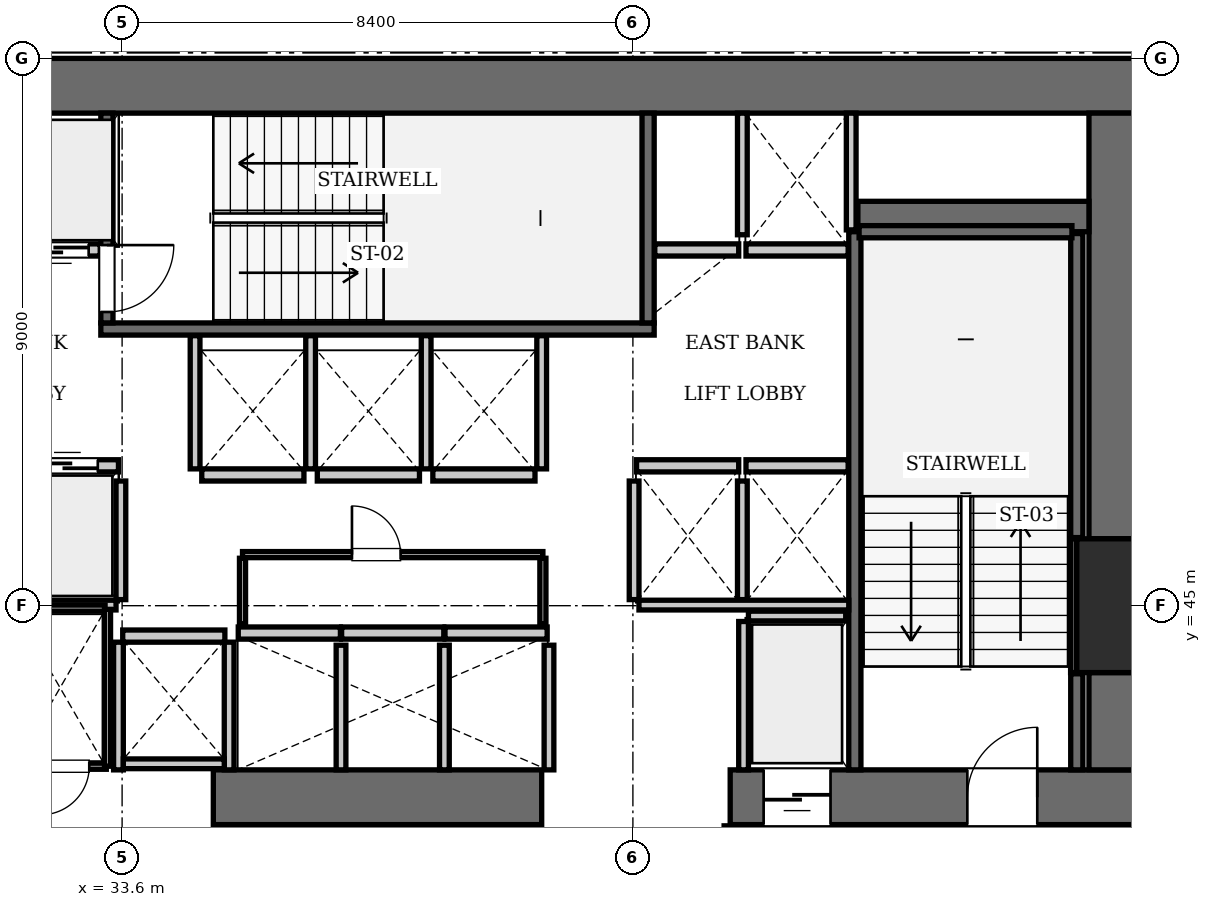
"""IFC4 building model, lengths in metres.
Left out: names, types, materials, properties, quantities, classifications, styles, units other than length and angle.
Written with IfcOpenShell. Run it as: python <this file> out.ifc"""

import sys

from ifc_helpers import new_model, si_unit, direction, frame, frame_2d, origin, origin_2d, place, context, subcontext, project, spatial, rectangle, extrude, element, fill, save


model = new_model("IFC4")
c1 = context("Model", 3, precision=1e-05, world=origin(), true_north=direction((0.0, 1.0)))
c2 = subcontext(c1, "Body", "Model", "MODEL_VIEW")
j1 = project(units=[si_unit("LENGTHUNIT", "METRE"), si_unit("PLANEANGLEUNIT", "RADIAN")], contexts=[c1])
p1 = place(None, origin())
s1 = spatial("IfcSite", under=j1, at=p1, CompositionType="ELEMENT")
p2 = place(p1, origin())
s2 = spatial("IfcBuilding", under=s1, at=p2, CompositionType="ELEMENT")
p3 = place(p2, frame((0.0, 0.0, 88.55)))
s3 = spatial("IfcBuildingStorey", under=s2, at=p3, CompositionType="ELEMENT", Elevation=88.55)
p4 = place(p3, frame((50.4, 45.0, 0.0), z_axis=(0.0, 0.0, 1.0), x_axis=(1.0, 0.0, 0.0)))
e1 = element("IfcColumn", 1, at=p4, inside=s3, PredefinedType="COLUMN", context=c2, shape_type="SweptSolid", body=[
    extrude(rectangle(XDim=2.2, YDim=2.2, at=origin_2d()), origin(), (0.0, 0.0, 1.0), 3.85),
])
p5 = place(p3, frame((25.2, 53.55, 0.0), z_axis=(0.0, 0.0, 1.0), x_axis=(1.0, 0.0, 0.0)))
e2 = element("IfcWall", 2, at=p5, inside=s3, PredefinedType="SHEAR", context=c2, shape_type="SweptSolid", body=[
    extrude(rectangle(XDim=25.2, YDim=0.9, at=frame_2d((12.6, 0.0))), origin(), (0.0, 0.0, 1.0), 3.85),
])
p6 = place(p3, frame((35.1, 41.85, 0.0), z_axis=(0.0, 0.0, 1.0), x_axis=(1.0, 0.0, 0.0)))
e3 = element("IfcWall", 3, at=p6, inside=s3, PredefinedType="SHEAR", context=c2, shape_type="SweptSolid", body=[
    extrude(rectangle(XDim=5.4, YDim=0.9, at=frame_2d((2.7, 0.0))), origin(), (0.0, 0.0, 1.0), 3.85),
])
p7 = place(p3, frame((43.6, 41.85, 0.0), z_axis=(0.0, 0.0, 1.0), x_axis=(1.0, 0.0, 0.0)))
e4 = element("IfcWall", 4, at=p7, inside=s3, PredefinedType="SHEAR", context=c2, shape_type="SweptSolid", body=[
    extrude(rectangle(XDim=6.8, YDim=0.9, at=frame_2d((3.4, 0.0))), origin(), (0.0, 0.0, 1.0), 3.85),
])
p8 = place(p7, frame((3.9, 0.0, 0.0)))
e5 = element("IfcOpeningElement", 5, at=p8, cuts=e4, PredefinedType="OPENING", context=c2, shape_type="SweptSolid", body=[
    extrude(rectangle(XDim=1.15, YDim=2.15, at=frame_2d((0.575, 1.075))), frame((0.0, 0.46, 0.0), z_axis=(0.0, -1.0, 0.0), x_axis=(1.0, 0.0, 0.0)), (0.0, 0.0, 1.0), 0.92),
])
p9 = place(p7, frame((0.55, 0.0, 0.0)))
e6 = element("IfcOpeningElement", 6, at=p9, cuts=e4, PredefinedType="OPENING", context=c2, shape_type="SweptSolid", body=[
    extrude(rectangle(XDim=1.1, YDim=2.2, at=frame_2d((0.55, 1.1))), frame((0.0, 0.46, 0.0), z_axis=(0.0, -1.0, 0.0), x_axis=(1.0, 0.0, 0.0)), (0.0, 0.0, 1.0), 0.92),
])
p10 = place(p3, frame((49.95, 42.3, 0.0), z_axis=(0.0, 0.0, 1.0), x_axis=(0.0, 1.0, 0.0)))
e7 = element("IfcWall", 7, at=p10, inside=s3, PredefinedType="SHEAR", context=c2, shape_type="SweptSolid", body=[
    extrude(rectangle(XDim=1.6, YDim=0.9, at=frame_2d((0.8, 0.0))), origin(), (0.0, 0.0, 1.0), 3.85),
])
p11 = place(p3, frame((49.95, 46.1, 0.0), z_axis=(0.0, 0.0, 1.0), x_axis=(0.0, 1.0, 0.0)))
e8 = element("IfcWall", 8, at=p11, inside=s3, PredefinedType="SHEAR", context=c2, shape_type="SweptSolid", body=[
    extrude(rectangle(XDim=7.0, YDim=0.9, at=frame_2d((3.5, 0.0))), origin(), (0.0, 0.0, 1.0), 3.85),
])
p12 = place(p3, frame((45.7, 51.4, 0.0), z_axis=(0.0, 0.0, 1.0), x_axis=(1.0, 0.0, 0.0)))
e9 = element("IfcWall", 9, at=p12, inside=s3, PredefinedType="SHEAR", context=c2, shape_type="SweptSolid", body=[
    extrude(rectangle(XDim=3.8, YDim=0.5, at=frame_2d((1.9, 0.0))), origin(), (0.0, 0.0, 1.0), 3.85),
])
p13 = place(p3, frame((33.25, 49.55, 0.0), z_axis=(0.0, 0.0, 1.0), x_axis=(1.0, 0.0, 0.0)))
e10 = element("IfcWall", 10, at=p13, inside=s3, PredefinedType="SOLIDWALL", context=c2, shape_type="SweptSolid", body=[
    extrude(rectangle(XDim=9.1, YDim=0.2, at=frame_2d((4.55, 0.0))), origin(), (0.0, 0.0, 1.0), 3.61),
])
p14 = place(p3, frame((42.25, 49.65, 0.0), z_axis=(0.0, 0.0, 1.0), x_axis=(0.0, 1.0, 0.0)))
e11 = element("IfcWall", 11, at=p14, inside=s3, PredefinedType="SOLIDWALL", context=c2, shape_type="SweptSolid", body=[
    extrude(rectangle(XDim=3.45, YDim=0.2, at=frame_2d((1.725, 0.0))), origin(), (0.0, 0.0, 1.0), 3.61),
])
p15 = place(p3, frame((33.35, 49.65, 0.0), z_axis=(0.0, 0.0, 1.0), x_axis=(0.0, 1.0, 0.0)))
e12 = element("IfcWall", 12, at=p15, inside=s3, PredefinedType="SOLIDWALL", context=c2, shape_type="SweptSolid", body=[
    extrude(rectangle(XDim=3.45, YDim=0.2, at=frame_2d((1.725, 0.0))), origin(), (0.0, 0.0, 1.0), 3.61),
])
p16 = place(p15, frame((0.18, 0.0, 0.0)))
e13 = element("IfcOpeningElement", 13, at=p16, cuts=e12, PredefinedType="OPENING", context=c2, shape_type="SweptSolid", body=[
    extrude(rectangle(XDim=1.1, YDim=2.15, at=frame_2d((0.55, 1.075))), frame((0.0, 0.11, 0.0), z_axis=(0.0, -1.0, 0.0), x_axis=(1.0, 0.0, 0.0)), (0.0, 0.0, 1.0), 0.22),
])
p17 = place(p3, frame((45.65, 42.3, 0.0), z_axis=(0.0, 0.0, 1.0), x_axis=(0.0, 1.0, 0.0)))
e14 = element("IfcWall", 14, at=p17, inside=s3, PredefinedType="SOLIDWALL", context=c2, shape_type="SweptSolid", body=[
    extrude(rectangle(XDim=8.85, YDim=0.2, at=frame_2d((4.425, 0.0))), origin(), (0.0, 0.0, 1.0), 3.61),
])
p18 = place(p3, frame((49.3, 42.3, 0.0), z_axis=(0.0, 0.0, 1.0), x_axis=(0.0, 1.0, 0.0)))
e15 = element("IfcWall", 15, at=p18, inside=s3, PredefinedType="SOLIDWALL", context=c2, shape_type="SweptSolid", body=[
    extrude(rectangle(XDim=1.58, YDim=0.2, at=frame_2d((0.79, 0.0))), origin(), (0.0, 0.0, 1.0), 3.61),
])
p19 = place(p3, frame((49.3, 46.12, 0.0), z_axis=(0.0, 0.0, 1.0), x_axis=(0.0, 1.0, 0.0)))
e16 = element("IfcWall", 16, at=p19, inside=s3, PredefinedType="SOLIDWALL", context=c2, shape_type="SweptSolid", body=[
    extrude(rectangle(XDim=5.0, YDim=0.2, at=frame_2d((2.5, 0.0))), origin(), (0.0, 0.0, 1.0), 3.61),
])
p20 = place(p3, frame((45.72, 51.15, 0.0), z_axis=(0.0, 0.0, 1.0), x_axis=(1.0, 0.0, 0.0)))
e17 = element("IfcWall", 17, at=p20, inside=s3, PredefinedType="SOLIDWALL", context=c2, shape_type="SweptSolid", body=[
    extrude(rectangle(XDim=3.5, YDim=0.2, at=frame_2d((1.75, 0.0))), origin(), (0.0, 0.0, 1.0), 3.61),
])
p21 = place(p3, frame((49.248, 43.9, 0.0), z_axis=(0.0, 0.0, 1.0), x_axis=(0.0, 1.0, 0.0)))
e18 = element("IfcWall", 18, at=p21, inside=s3, PredefinedType="SOLIDWALL", context=c2, shape_type="SweptSolid", body=[
    extrude(rectangle(XDim=2.2, YDim=0.1, at=frame_2d((1.1, 0.0))), origin(), (0.0, 0.0, 1.0), 3.61),
])
p22 = place(p3, frame((31.86, 47.3, 0.0), z_axis=(0.0, 0.0, 1.0), x_axis=(1.0, 0.0, 0.0)))
e19 = element("IfcWall", 19, at=p22, inside=s3, PredefinedType="SOLIDWALL", context=c2, shape_type="SweptSolid", body=[
    extrude(rectangle(XDim=1.68, YDim=0.2, at=frame_2d((0.84, 0.0))), origin(), (0.0, 0.0, 1.0), 3.61),
])
p23 = place(p22, frame((0.34, 0.0, 0.0)))
e20 = element("IfcOpeningElement", 20, at=p23, cuts=e19, PredefinedType="OPENING", context=c2, shape_type="SweptSolid", body=[
    extrude(rectangle(XDim=1.0, YDim=2.15, at=frame_2d((0.5, 1.075))), frame((0.0, 0.11, 0.0), z_axis=(0.0, -1.0, 0.0), x_axis=(1.0, 0.0, 0.0)), (0.0, 0.0, 1.0), 0.22),
])
p24 = place(p3, frame((31.86, 50.85, 0.0), z_axis=(0.0, 0.0, 1.0), x_axis=(1.0, 0.0, 0.0)))
e21 = element("IfcWall", 21, at=p24, inside=s3, PredefinedType="SOLIDWALL", context=c2, shape_type="SweptSolid", body=[
    extrude(rectangle(XDim=1.38, YDim=0.2, at=frame_2d((0.69, 0.0))), origin(), (0.0, 0.0, 1.0), 3.61),
])
p25 = place(p24, frame((0.19, 0.0, 0.0)))
e22 = element("IfcOpeningElement", 22, at=p25, cuts=e21, PredefinedType="OPENING", context=c2, shape_type="SweptSolid", body=[
    extrude(rectangle(XDim=1.0, YDim=2.15, at=frame_2d((0.5, 1.075))), frame((0.0, 0.11, 0.0), z_axis=(0.0, -1.0, 0.0), x_axis=(1.0, 0.0, 0.0)), (0.0, 0.0, 1.0), 0.22),
])
for number, where, z_axis, x_axis in (
    (23, (42.06, 47.3, 0.0), (0.0, 0.0, 1.0), (1.0, 0.0, 0.0)),
    (24, (43.86, 47.3, 0.0), (0.0, 0.0, 1.0), (1.0, 0.0, 0.0)),
):
    element("IfcWall", number, at=place(p3, frame(where, z_axis=z_axis, x_axis=x_axis)), inside=s3, PredefinedType="SOLIDWALL", context=c2, shape_type="SweptSolid", body=[
        extrude(rectangle(XDim=1.68, YDim=0.2, at=frame_2d((0.84, 0.0))), origin(), (0.0, 0.0, 1.0), 3.61),
    ])
p26 = place(p3, frame((42.36, 50.85, 0.0), z_axis=(0.0, 0.0, 1.0), x_axis=(1.0, 0.0, 0.0)))
e25 = element("IfcWall", 25, at=p26, inside=s3, PredefinedType="SOLIDWALL", context=c2, shape_type="SweptSolid", body=[
    extrude(rectangle(XDim=1.38, YDim=0.2, at=frame_2d((0.69, 0.0))), origin(), (0.0, 0.0, 1.0), 3.61),
])
for number, where, z_axis, x_axis in (
    (26, (43.86, 50.85, 0.0), (0.0, 0.0, 1.0), (1.0, 0.0, 0.0)),
    (27, (35.51, 44.55, 0.0), (0.0, 0.0, 1.0), (1.0, 0.0, 0.0)),
    (28, (37.21, 44.55, 0.0), (0.0, 0.0, 1.0), (1.0, 0.0, 0.0)),
):
    element("IfcWall", number, at=place(p3, frame(where, z_axis=z_axis, x_axis=x_axis)), inside=s3, PredefinedType="SOLIDWALL", context=c2, shape_type="SweptSolid", body=[
        extrude(rectangle(XDim=1.68, YDim=0.2, at=frame_2d((0.84, 0.0))), origin(), (0.0, 0.0, 1.0), 3.61),
    ])
for number, where, z_axis, x_axis in (
    (29, (38.91, 44.55, 0.0), (0.0, 0.0, 1.0), (1.0, 0.0, 0.0)),
    (30, (34.91, 47.15, 0.0), (0.0, 0.0, 1.0), (1.0, 0.0, 0.0)),
):
    element("IfcWall", number, at=place(p3, frame(where, z_axis=z_axis, x_axis=x_axis)), inside=s3, PredefinedType="SOLIDWALL", context=c2, shape_type="SweptSolid", body=[
        extrude(rectangle(XDim=1.68, YDim=0.2, at=frame_2d((0.84, 0.0))), origin(), (0.0, 0.0, 1.0), 3.61),
    ])
for number, where, z_axis, x_axis in (
    (31, (36.81, 47.15, 0.0), (0.0, 0.0, 1.0), (1.0, 0.0, 0.0)),
    (32, (38.71, 47.15, 0.0), (0.0, 0.0, 1.0), (1.0, 0.0, 0.0)),
    (33, (33.61, 44.5, 0.0), (0.0, 0.0, 1.0), (1.0, 0.0, 0.0)),
):
    element("IfcWall", number, at=place(p3, frame(where, z_axis=z_axis, x_axis=x_axis)), inside=s3, PredefinedType="SOLIDWALL", context=c2, shape_type="SweptSolid", body=[
        extrude(rectangle(XDim=1.68, YDim=0.2, at=frame_2d((0.84, 0.0))), origin(), (0.0, 0.0, 1.0), 3.61),
    ])
p27 = place(p3, frame((43.9, 44.83, 0.0), z_axis=(0.0, 0.0, 1.0), x_axis=(1.0, 0.0, 0.0)))
e34 = element("IfcWall", 34, at=p27, inside=s3, PredefinedType="SOLIDWALL", context=c2, shape_type="SweptSolid", body=[
    extrude(rectangle(XDim=1.6, YDim=0.16, at=frame_2d((0.8, 0.0))), origin(), (0.0, 0.0, 1.0), 3.61),
])
p28 = place(p3, frame((43.82, 42.3, 0.0), z_axis=(0.0, 0.0, 1.0), x_axis=(0.0, 1.0, 0.0)))
e35 = element("IfcWall", 35, at=p28, inside=s3, PredefinedType="SOLIDWALL", context=c2, shape_type="SweptSolid", body=[
    extrude(rectangle(XDim=2.44, YDim=0.16, at=frame_2d((1.22, 0.0))), origin(), (0.0, 0.0, 1.0), 3.61),
])
p29 = place(p3, frame((33.58, 45.1, 0.0), z_axis=(0.0, 0.0, 1.0), x_axis=(0.0, 1.0, 0.0)))
e36 = element("IfcWall", 36, at=p29, inside=s3, PredefinedType="SOLIDWALL", context=c2, shape_type="SweptSolid", body=[
    extrude(rectangle(XDim=1.95, YDim=0.16, at=frame_2d((0.975, 0.0))), origin(), (0.0, 0.0, 1.0), 3.61),
])
p30 = place(p3, frame((30.05, 45.01, 0.0), z_axis=(0.0, 0.0, 1.0), x_axis=(1.0, 0.0, 0.0)))
e37 = element("IfcWall", 37, at=p30, inside=s3, PredefinedType="SOLIDWALL", context=c2, shape_type="SweptSolid", body=[
    extrude(rectangle(XDim=3.45, YDim=0.16, at=frame_2d((1.725, 0.0))), origin(), (0.0, 0.0, 1.0), 3.61),
])
for number, where, z_axis, x_axis in (
    (38, (42.02, 45.1, 0.0), (0.0, 0.0, 1.0), (0.0, 1.0, 0.0)),
    (39, (43.8, 45.1, 0.0), (0.0, 0.0, 1.0), (0.0, 1.0, 0.0)),
):
    element("IfcWall", number, at=place(p3, frame(where, z_axis=z_axis, x_axis=x_axis)), inside=s3, PredefinedType="SOLIDWALL", context=c2, shape_type="SweptSolid", body=[
        extrude(rectangle(XDim=1.95, YDim=0.16, at=frame_2d((0.975, 0.0))), origin(), (0.0, 0.0, 1.0), 3.61),
    ])
p31 = place(p3, frame((42.1, 45.01, 0.0), z_axis=(0.0, 0.0, 1.0), x_axis=(1.0, 0.0, 0.0)))
e40 = element("IfcWall", 40, at=p31, inside=s3, PredefinedType="SOLIDWALL", context=c2, shape_type="SweptSolid", body=[
    extrude(rectangle(XDim=3.45, YDim=0.16, at=frame_2d((1.725, 0.0))), origin(), (0.0, 0.0, 1.0), 3.61),
])
p32 = place(p3, frame((45.59, 51.18, 0.0), z_axis=(0.0, 0.0, 1.0), x_axis=(0.0, 1.0, 0.0)))
e41 = element("IfcWall", 41, at=p32, inside=s3, PredefinedType="SOLIDWALL", context=c2, shape_type="SweptSolid", body=[
    extrude(rectangle(XDim=1.92, YDim=0.16, at=frame_2d((0.96, 0.0))), origin(), (0.0, 0.0, 1.0), 3.61),
])
p33 = place(p3, frame((43.8, 51.1, 0.0), z_axis=(0.0, 0.0, 1.0), x_axis=(0.0, 1.0, 0.0)))
e42 = element("IfcWall", 42, at=p33, inside=s3, PredefinedType="SOLIDWALL", context=c2, shape_type="SweptSolid", body=[
    extrude(rectangle(XDim=2.0, YDim=0.16, at=frame_2d((1.0, 0.0))), origin(), (0.0, 0.0, 1.0), 3.61),
])
for number, where, z_axis, x_axis in (
    (43, (37.2, 42.3, 0.0), (0.0, 0.0, 1.0), (0.0, 1.0, 0.0)),
    (44, (38.9, 42.3, 0.0), (0.0, 0.0, 1.0), (0.0, 1.0, 0.0)),
    (45, (40.62, 42.3, 0.0), (0.0, 0.0, 1.0), (0.0, 1.0, 0.0)),
):
    element("IfcWall", number, at=place(p3, frame(where, z_axis=z_axis, x_axis=x_axis)), inside=s3, PredefinedType="SOLIDWALL", context=c2, shape_type="SweptSolid", body=[
        extrude(rectangle(XDim=2.05, YDim=0.16, at=frame_2d((1.025, 0.0))), origin(), (0.0, 0.0, 1.0), 3.61),
    ])
for number, where, z_axis, x_axis in (
    (46, (34.8, 47.25, 0.0), (0.0, 0.0, 1.0), (0.0, 1.0, 0.0)),
    (47, (36.7, 47.25, 0.0), (0.0, 0.0, 1.0), (0.0, 1.0, 0.0)),
    (48, (38.6, 47.25, 0.0), (0.0, 0.0, 1.0), (0.0, 1.0, 0.0)),
    (49, (40.5, 47.25, 0.0), (0.0, 0.0, 1.0), (0.0, 1.0, 0.0)),
):
    element("IfcWall", number, at=place(p3, frame(where, z_axis=z_axis, x_axis=x_axis)), inside=s3, PredefinedType="SOLIDWALL", context=c2, shape_type="SweptSolid", body=[
        extrude(rectangle(XDim=2.19, YDim=0.16, at=frame_2d((1.095, 0.0))), origin(), (0.0, 0.0, 1.0), 3.61),
    ])
for number, where, z_axis, x_axis in (
    (50, (33.54, 42.3, 0.0), (0.0, 0.0, 1.0), (0.0, 1.0, 0.0)),
    (51, (35.36, 42.3, 0.0), (0.0, 0.0, 1.0), (0.0, 1.0, 0.0)),
):
    element("IfcWall", number, at=place(p3, frame(where, z_axis=z_axis, x_axis=x_axis)), inside=s3, PredefinedType="SOLIDWALL", context=c2, shape_type="SweptSolid", body=[
        extrude(rectangle(XDim=2.1, YDim=0.16, at=frame_2d((1.05, 0.0))), origin(), (0.0, 0.0, 1.0), 3.61),
    ])
p34 = place(p3, frame((33.62, 42.4, 0.0), z_axis=(0.0, 0.0, 1.0), x_axis=(1.0, 0.0, 0.0)))
e52 = element("IfcWall", 52, at=p34, inside=s3, PredefinedType="SOLIDWALL", context=c2, shape_type="SweptSolid", body=[
    extrude(rectangle(XDim=1.66, YDim=0.16, at=frame_2d((0.83, 0.0))), origin(), (0.0, 0.0, 1.0), 3.61),
])
for number, where, z_axis, x_axis in (
    (53, (43.6, 38.31, 0.0), (0.0, 0.0, 1.0), (0.0, 1.0, 0.0)),
    (54, (49.4, 38.31, 0.0), (0.0, 0.0, 1.0), (0.0, 1.0, 0.0)),
):
    element("IfcWall", number, at=place(p3, frame(where, z_axis=z_axis, x_axis=x_axis)), inside=s3, PredefinedType="PARTITIONING", context=c2, shape_type="SweptSolid", body=[
        extrude(rectangle(XDim=3.07, YDim=0.2, at=frame_2d((1.535, 0.0))), origin(), (0.0, 0.0, 1.0), 3.61),
    ])
p35 = place(p3, frame((32.02, 42.36, 0.0), z_axis=(0.0, 0.0, 1.0), x_axis=(1.0, 0.0, 0.0)))
e55 = element("IfcWall", 55, at=p35, inside=s3, PredefinedType="PARTITIONING", context=c2, shape_type="SweptSolid", body=[
    extrude(rectangle(XDim=1.32, YDim=0.1, at=frame_2d((0.66, 0.0))), origin(), (0.0, 0.0, 1.0), 3.61),
])
p36 = place(p35, frame((0.24, 0.0, 0.0)))
e56 = element("IfcOpeningElement", 56, at=p36, cuts=e55, PredefinedType="OPENING", context=c2, shape_type="SweptSolid", body=[
    extrude(rectangle(XDim=0.8, YDim=2.05, at=frame_2d((0.4, 1.025))), frame((0.0, 0.06, 0.0), z_axis=(0.0, -1.0, 0.0), x_axis=(1.0, 0.0, 0.0)), (0.0, 0.0, 1.0), 0.12),
])
p37 = place(p3, frame((31.84, 44.96, 0.0), z_axis=(0.0, 0.0, 1.0), x_axis=(1.0, 0.0, 0.0)))
e57 = element("IfcWall", 57, at=p37, inside=s3, PredefinedType="PARTITIONING", context=c2, shape_type="SweptSolid", body=[
    extrude(rectangle(XDim=1.48, YDim=0.1, at=frame_2d((0.74, 0.0))), origin(), (0.0, 0.0, 1.0), 3.61),
])
p38 = place(p3, frame((33.36, 42.36, 0.0), z_axis=(0.0, 0.0, 1.0), x_axis=(0.0, 1.0, 0.0)))
e58 = element("IfcWall", 58, at=p38, inside=s3, PredefinedType="PARTITIONING", context=c2, shape_type="SweptSolid", body=[
    extrude(rectangle(XDim=2.58, YDim=0.1, at=frame_2d((1.29, 0.0))), origin(), (0.0, 0.0, 1.0), 3.61),
])
p39 = place(p3, frame((35.58, 45.84, 0.0), z_axis=(0.0, 0.0, 1.0), x_axis=(1.0, 0.0, 0.0)))
e59 = element("IfcWall", 59, at=p39, inside=s3, PredefinedType="PARTITIONING", context=c2, shape_type="SweptSolid", body=[
    extrude(rectangle(XDim=4.94, YDim=0.1, at=frame_2d((2.47, 0.0))), origin(), (0.0, 0.0, 1.0), 3.61),
])
p40 = place(p39, frame((1.8, 0.0, 0.0)))
e60 = element("IfcOpeningElement", 60, at=p40, cuts=e59, PredefinedType="OPENING", context=c2, shape_type="SweptSolid", body=[
    extrude(rectangle(XDim=0.8, YDim=2.05, at=frame_2d((0.4, 1.025))), frame((0.0, 0.06, 0.0), z_axis=(0.0, -1.0, 0.0), x_axis=(1.0, 0.0, 0.0)), (0.0, 0.0, 1.0), 0.12),
])
for number, where, z_axis, x_axis in (
    (61, (35.58, 44.7, 0.0), (0.0, 0.0, 1.0), (0.0, 1.0, 0.0)),
    (62, (40.52, 44.7, 0.0), (0.0, 0.0, 1.0), (0.0, 1.0, 0.0)),
):
    element("IfcWall", number, at=place(p3, frame(where, z_axis=z_axis, x_axis=x_axis)), inside=s3, PredefinedType="PARTITIONING", context=c2, shape_type="SweptSolid", body=[
        extrude(rectangle(XDim=1.08, YDim=0.1, at=frame_2d((0.54, 0.0))), origin(), (0.0, 0.0, 1.0), 3.61),
    ])
p41 = place(p16, frame((1.1, 0.0, 0.0), z_axis=(0.0, 0.0, 1.0), x_axis=(-1.0, 0.0, 0.0)))
e63 = element("IfcDoor", 63, at=p41, inside=s3, OperationType="SINGLE_SWING_LEFT", PredefinedType="DOOR", context=c2, shape_type="SweptSolid", body=[
    extrude(rectangle(XDim=1.1, YDim=2.15, at=frame_2d((0.55, 1.075))), frame((0.0, 0.025, 0.0), z_axis=(0.0, -1.0, 0.0), x_axis=(1.0, 0.0, 0.0)), (0.0, 0.0, 1.0), 0.05),
])
fill(e13, e63)
p42 = place(p8, origin())
e64 = element("IfcDoor", 64, at=p42, inside=s3, OperationType="SINGLE_SWING_RIGHT", PredefinedType="DOOR", context=c2, shape_type="SweptSolid", body=[
    extrude(rectangle(XDim=1.15, YDim=2.15, at=frame_2d((0.575, 1.075))), frame((0.0, 0.025, 0.0), z_axis=(0.0, -1.0, 0.0), x_axis=(1.0, 0.0, 0.0)), (0.0, 0.0, 1.0), 0.05),
])
fill(e5, e64)
p43 = place(p23, origin())
e65 = element("IfcDoor", 65, at=p43, inside=s3, OperationType="SLIDING_TO_LEFT", PredefinedType="DOOR", context=c2, shape_type="SweptSolid", body=[
    extrude(rectangle(XDim=1.0, YDim=2.15, at=frame_2d((0.5, 1.075))), frame((0.0, 0.025, 0.0), z_axis=(0.0, -1.0, 0.0), x_axis=(1.0, 0.0, 0.0)), (0.0, 0.0, 1.0), 0.05),
])
fill(e20, e65)
p44 = place(p25, frame((1.0, 0.0, 0.0), z_axis=(0.0, 0.0, 1.0), x_axis=(-1.0, 0.0, 0.0)))
e66 = element("IfcDoor", 66, at=p44, inside=s3, OperationType="SLIDING_TO_LEFT", PredefinedType="DOOR", context=c2, shape_type="SweptSolid", body=[
    extrude(rectangle(XDim=1.0, YDim=2.15, at=frame_2d((0.5, 1.075))), frame((0.0, 0.025, 0.0), z_axis=(0.0, -1.0, 0.0), x_axis=(1.0, 0.0, 0.0)), (0.0, 0.0, 1.0), 0.05),
])
fill(e22, e66)
p45 = place(p9, frame((1.1, 0.0, 0.0), z_axis=(0.0, 0.0, 1.0), x_axis=(-1.0, 0.0, 0.0)))
e67 = element("IfcDoor", 67, at=p45, inside=s3, OperationType="SLIDING_TO_LEFT", PredefinedType="DOOR", context=c2, shape_type="SweptSolid", body=[
    extrude(rectangle(XDim=1.1, YDim=2.2, at=frame_2d((0.55, 1.1))), frame((0.0, 0.025, 0.0), z_axis=(0.0, -1.0, 0.0), x_axis=(1.0, 0.0, 0.0)), (0.0, 0.0, 1.0), 0.05),
])
fill(e6, e67)
p46 = place(p36, frame((0.8, 0.0, 0.0), z_axis=(0.0, 0.0, 1.0), x_axis=(-1.0, 0.0, 0.0)))
e68 = element("IfcDoor", 68, at=p46, inside=s3, OperationType="SINGLE_SWING_RIGHT", PredefinedType="DOOR", context=c2, shape_type="SweptSolid", body=[
    extrude(rectangle(XDim=0.8, YDim=2.05, at=frame_2d((0.4, 1.025))), frame((0.0, 0.025, 0.0), z_axis=(0.0, -1.0, 0.0), x_axis=(1.0, 0.0, 0.0)), (0.0, 0.0, 1.0), 0.05),
])
fill(e56, e68)
p47 = place(p40, origin())
e69 = element("IfcDoor", 69, at=p47, inside=s3, OperationType="SINGLE_SWING_LEFT", PredefinedType="DOOR", context=c2, shape_type="SweptSolid", body=[
    extrude(rectangle(XDim=0.8, YDim=2.05, at=frame_2d((0.4, 1.025))), frame((0.0, 0.025, 0.0), z_axis=(0.0, -1.0, 0.0), x_axis=(1.0, 0.0, 0.0)), (0.0, 0.0, 1.0), 0.05),
])
fill(e60, e69)
save(model, sys.argv[1])
